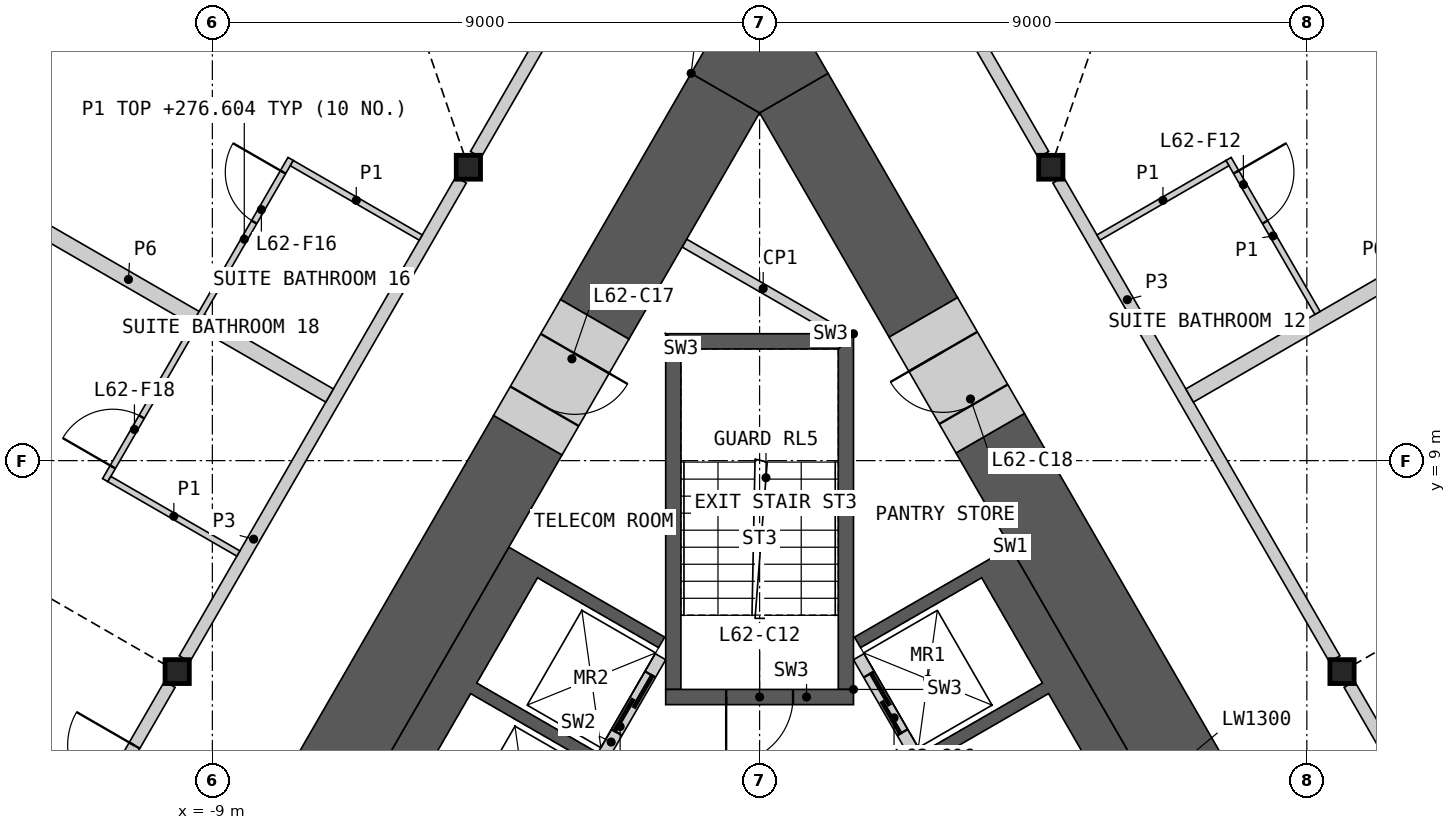
"""IFC4 building model, lengths in metres.
Left out: names, types, materials, properties, quantities, classifications, styles, units other than length and angle.
Written with IfcOpenShell. Run it as: python <this file> out.ifc"""

import sys

from ifc_helpers import new_model, si_unit, direction, frame, frame_2d, origin, origin_2d, place, context, subcontext, project, spatial, polyline, rectangle, i_section, outline, extrude, element, fill, save


model = new_model("IFC4")
c1 = context("Model", 3, precision=1e-05, world=origin(), true_north=direction((0.0, 1.0)))
c2 = subcontext(c1, "Body", "Model", "MODEL_VIEW")
j1 = project(units=[si_unit("LENGTHUNIT", "METRE"), si_unit("PLANEANGLEUNIT", "RADIAN")], contexts=[c1])
p1 = place(None, origin())
s1 = spatial("IfcSite", under=j1, at=p1, CompositionType="ELEMENT")
p2 = place(p1, origin())
s2 = spatial("IfcBuilding", under=s1, at=p2, CompositionType="ELEMENT")
p3 = place(p2, frame((0.0, 0.0, 274.2)))
s3 = spatial("IfcBuildingStorey", under=s2, at=p3, CompositionType="ELEMENT", Elevation=274.2)
for number, where, z_axis, x_axis in (
    (1, (-4.789, 13.825, 0.0), (0.0, 0.0, 1.0), (1.0, 0.0, 0.0)),
    (2, (-9.578, 5.53, 0.0), (0.0, 0.0, 1.0), (1.0, 0.0, 0.0)),
    (3, (9.578, 5.53, 0.0), (0.0, 0.0, 1.0), (1.0, 0.0, 0.0)),
    (4, (4.789, 13.825, 0.0), (0.0, 0.0, 1.0), (1.0, 0.0, 0.0)),
):
    element("IfcColumn", number, at=place(p3, frame(where, z_axis=z_axis, x_axis=x_axis)), inside=s3, PredefinedType="COLUMN", context=c2, shape_type="SweptSolid", body=[
        extrude(i_section(OverallWidth=0.399, OverallDepth=0.393, WebThickness=0.023, FlangeThickness=0.037, at=origin_2d()), origin(), (0.0, 0.0, 1.0), 3.6),
    ])
p4 = place(p3, origin())
e5 = element("IfcWall", 5, at=p4, inside=s3, PredefinedType="SHEAR", context=c2, shape_type="SweptSolid", body=[
    extrude(outline(polyline([(4.124, 7.577), (8.624, -0.217), (8.231, -0.444), (6.061, -1.697), (5.96, -1.524), (7.952, -0.374), (4.752, 5.169), (2.76, 4.019), (2.66, 4.192), (4.652, 5.342), (3.652, 7.074), (1.66, 5.924), (1.561, 6.097), (3.731, 7.35), (4.124, 7.577)])), origin(), (0.0, 0.0, 1.0), 3.25),
])
p5 = place(p3, frame((5.817, -1.476, 0.0), z_axis=(0.0, 0.0, 1.0), x_axis=(-0.500002616675, 0.866023893041, 0.0)))
e6 = element("IfcWall", 6, at=p5, inside=s3, PredefinedType="SOLIDWALL", context=c2, shape_type="SweptSolid", body=[
    extrude(rectangle(XDim=8.373, YDim=0.2, at=frame_2d((4.187, 0.0))), origin(), (0.0, 0.0, 1.0), 3.25),
])
p6 = place(p5, frame((2.637, 0.0, 0.0)))
e7 = element("IfcOpeningElement", 7, at=p6, cuts=e6, PredefinedType="OPENING", context=c2, shape_type="SweptSolid", body=[
    extrude(rectangle(XDim=0.9, YDim=2.1, at=frame_2d((0.45, 1.05))), frame((0.0, 0.11, 0.0), z_axis=(0.0, -1.0, 0.0), x_axis=(1.0, 0.0, 0.0)), (0.0, 0.0, 1.0), 0.22),
])
p7 = place(p5, frame((6.937, 0.0, 0.0)))
e8 = element("IfcOpeningElement", 8, at=p7, cuts=e6, PredefinedType="OPENING", context=c2, shape_type="SweptSolid", body=[
    extrude(rectangle(XDim=1.1, YDim=2.1, at=frame_2d((0.55, 1.05))), frame((0.0, 0.11, 0.0), z_axis=(0.0, -1.0, 0.0), x_axis=(1.0, 0.0, 0.0)), (0.0, 0.0, 1.0), 0.22),
])
p8 = place(p3, origin())
e9 = element("IfcWall", 9, at=p8, inside=s3, PredefinedType="SHEAR", context=c2, shape_type="SweptSolid", body=[
    extrude(outline(polyline([(-7.524, 1.688), (-4.124, 7.577), (-3.731, 7.35), (-1.561, 6.097), (-1.66, 5.924), (-3.652, 7.074), (-4.652, 5.342), (-2.66, 4.192), (-2.76, 4.019), (-4.752, 5.169), (-5.752, 3.437), (-3.76, 2.287), (-3.861, 2.113), (-5.852, 3.263), (-6.852, 1.531), (-4.861, 0.381), (-4.96, 0.208), (-7.131, 1.461), (-7.524, 1.688)])), origin(), (0.0, 0.0, 1.0), 3.25),
])
p9 = place(p3, frame((-1.631, 5.776, 0.0), z_axis=(0.0, 0.0, 1.0), x_axis=(-0.499992876559, -0.866029516466, 0.0)))
e10 = element("IfcWall", 10, at=p9, inside=s3, PredefinedType="SOLIDWALL", context=c2, shape_type="SweptSolid", body=[
    extrude(rectangle(XDim=6.486, YDim=0.2, at=frame_2d((3.243, 0.0))), origin(), (0.0, 0.0, 1.0), 3.25),
])
p10 = place(p9, frame((0.337, 0.0, 0.0)))
e11 = element("IfcOpeningElement", 11, at=p10, cuts=e10, PredefinedType="OPENING", context=c2, shape_type="SweptSolid", body=[
    extrude(rectangle(XDim=1.1, YDim=2.1, at=frame_2d((0.55, 1.05))), frame((0.0, 0.11, 0.0), z_axis=(0.0, -1.0, 0.0), x_axis=(1.0, 0.0, 0.0)), (0.0, 0.0, 1.0), 0.22),
])
p11 = place(p9, frame((2.537, 0.0, 0.0)))
e12 = element("IfcOpeningElement", 12, at=p11, cuts=e10, PredefinedType="OPENING", context=c2, shape_type="SweptSolid", body=[
    extrude(rectangle(XDim=1.1, YDim=2.1, at=frame_2d((0.55, 1.05))), frame((0.0, 0.11, 0.0), z_axis=(0.0, -1.0, 0.0), x_axis=(1.0, 0.0, 0.0)), (0.0, 0.0, 1.0), 0.22),
])
p12 = place(p3, origin())
e13 = element("IfcWall", 13, at=p12, inside=s3, PredefinedType="SHEAR", context=c2, shape_type="SweptSolid", body=[
    extrude(outline(polyline([(1.544, 5.237), (1.544, 11.087), (1.294, 10.837), (1.294, 5.237), (1.544, 5.237)])), origin(), (0.0, 0.0, 1.0), 3.25),
])
p13 = place(p3, origin())
e14 = element("IfcWall", 14, at=p13, inside=s3, PredefinedType="SHEAR", context=c2, shape_type="SweptSolid", body=[
    extrude(outline(polyline([(1.544, 11.087), (-1.544, 11.087), (-1.294, 10.837), (1.294, 10.837), (1.544, 11.087)])), origin(), (0.0, 0.0, 1.0), 3.25),
])
p14 = place(p3, origin())
e15 = element("IfcWall", 15, at=p14, inside=s3, PredefinedType="SHEAR", context=c2, shape_type="SweptSolid", body=[
    extrude(outline(polyline([(-1.294, 10.837), (-1.544, 11.087), (-1.544, 5.237), (-1.294, 5.237), (-1.294, 10.837)])), origin(), (0.0, 0.0, 1.0), 3.25),
])
p15 = place(p3, frame((1.544, 5.112, 0.0), z_axis=(0.0, 0.0, 1.0), x_axis=(-1.0, 0.0, 0.0)))
e16 = element("IfcWall", 16, at=p15, inside=s3, PredefinedType="SHEAR", context=c2, shape_type="SweptSolid", body=[
    extrude(rectangle(XDim=3.088, YDim=0.25, at=frame_2d((1.544, 0.0))), origin(), (0.0, 0.0, 1.0), 3.25),
])
p16 = place(p15, frame((0.994, 0.0, 0.0)))
e17 = element("IfcOpeningElement", 17, at=p16, cuts=e16, PredefinedType="OPENING", context=c2, shape_type="SweptSolid", body=[
    extrude(rectangle(XDim=1.1, YDim=2.1, at=frame_2d((0.55, 1.05))), frame((0.0, 0.135, 0.0), z_axis=(0.0, -1.0, 0.0), x_axis=(1.0, 0.0, 0.0)), (0.0, 0.0, 1.0), 0.27),
])
p17 = place(p3, frame((-1.237, 12.578, 0.0), z_axis=(0.0, 0.0, 1.0), x_axis=(0.866045649925, -0.499964931016, 0.0)))
e18 = element("IfcWall", 18, at=p17, inside=s3, PredefinedType="PARTITIONING", context=c2, shape_type="SweptSolid", body=[
    extrude(rectangle(XDim=2.992, YDim=0.15, at=frame_2d((1.496, 0.0))), origin(), (0.0, 0.0, 1.0), 3.25),
])
p18 = place(p3, frame((10.062, -1.408, 0.0), z_axis=(0.0, 0.0, 1.0), x_axis=(-0.500000545805, 0.866025088663, 0.0)))
e19 = element("IfcWall", 19, at=p18, inside=s3, PredefinedType="SHEAR", context=c2, shape_type="SweptSolid", body=[
    extrude(rectangle(XDim=12.539, YDim=1.3, at=frame_2d((6.27, 0.0))), origin(), (0.0, 0.0, 1.0), 3.25),
])
p19 = place(p3, frame((2.693, 11.356, 0.0), z_axis=(0.0, 0.0, 1.0), x_axis=(-0.50002837164, 0.866009022791, 0.0)))
e20 = element("IfcWall", 20, at=p19, inside=s3, PredefinedType="SHEAR", context=c2, shape_type="SweptSolid", body=[
    extrude(rectangle(XDim=4.26, YDim=1.3, at=frame_2d((2.13, 0.0))), origin(), (0.0, 0.0, 1.0), 3.25),
])
p20 = place(p3, frame((-3.812, 9.418, 0.0), z_axis=(0.0, 0.0, 1.0), x_axis=(-0.499995037753, -0.86602826872, 0.0)))
e21 = element("IfcWall", 21, at=p20, inside=s3, PredefinedType="SHEAR", context=c2, shape_type="SweptSolid", body=[
    extrude(rectangle(XDim=8.451, YDim=1.3, at=frame_2d((4.225, 0.0))), origin(), (0.0, 0.0, 1.0), 3.25),
])
p21 = place(p3, frame((-0.563, 15.045, 0.0), z_axis=(0.0, 0.0, 1.0), x_axis=(-0.499994567278, -0.866028540345, 0.0)))
e22 = element("IfcWall", 22, at=p21, inside=s3, PredefinedType="SHEAR", context=c2, shape_type="SweptSolid", body=[
    extrude(rectangle(XDim=4.297, YDim=1.3, at=frame_2d((2.149, 0.0))), origin(), (0.0, 0.0, 1.0), 3.25),
])
p22 = place(p3, origin())
e23 = element("IfcWall", 23, at=p22, inside=s3, PredefinedType="SHEAR", context=c2, shape_type="SweptSolid", body=[
    extrude(outline(polyline([(-1.126, 15.371), (0.0, 17.321), (1.126, 15.371), (0.0, 14.72), (-1.126, 15.371)])), origin(), (0.0, 0.0, 1.0), 3.25),
])
p23 = place(p3, frame((-2.712, 11.324, 0.0), z_axis=(0.0, 0.0, 1.0), x_axis=(-0.499946605688, -0.86605622881, 0.0)))
e24 = element("IfcWall", 24, at=p23, inside=s3, PredefinedType="SHEAR", context=c2, shape_type="SweptSolid", body=[
    extrude(rectangle(XDim=2.2, YDim=1.3, at=frame_2d((1.1, 0.0))), origin(), (0.0, 0.0, 1.0), 3.25),
])
p24 = place(p23, frame((0.65, 0.0, 0.0)))
e25 = element("IfcOpeningElement", 25, at=p24, cuts=e24, PredefinedType="OPENING", context=c2, shape_type="SweptSolid", body=[
    extrude(rectangle(XDim=1.0, YDim=2.1, at=frame_2d((0.5, 1.05))), frame((0.0, 0.66, 0.0), z_axis=(0.0, -1.0, 0.0), x_axis=(1.0, 0.0, 0.0)), (0.0, 0.0, 1.0), 1.32),
])
p25 = place(p3, frame((3.793, 9.451, 0.0), z_axis=(0.0, 0.0, 1.0), x_axis=(-0.499946605688, 0.86605622881, 0.0)))
e26 = element("IfcWall", 26, at=p25, inside=s3, PredefinedType="SHEAR", context=c2, shape_type="SweptSolid", body=[
    extrude(rectangle(XDim=2.2, YDim=1.3, at=frame_2d((1.1, 0.0))), origin(), (0.0, 0.0, 1.0), 3.25),
])
p26 = place(p25, frame((0.55, 0.0, 0.0)))
e27 = element("IfcOpeningElement", 27, at=p26, cuts=e26, PredefinedType="OPENING", context=c2, shape_type="SweptSolid", body=[
    extrude(rectangle(XDim=1.0, YDim=2.1, at=frame_2d((0.5, 1.05))), frame((0.0, 0.66, 0.0), z_axis=(0.0, -1.0, 0.0), x_axis=(1.0, 0.0, 0.0)), (0.0, 0.0, 1.0), 1.32),
])
p27 = place(p3, frame((-14.247, -2.556, 0.0), z_axis=(0.0, 0.0, 1.0), x_axis=(0.49998193945, 0.866035830797, 0.0)))
e28 = element("IfcWall", 28, at=p27, inside=s3, PredefinedType="PARTITIONING", context=c2, shape_type="SweptSolid", body=[
    extrude(rectangle(XDim=9.094, YDim=0.2, at=frame_2d((4.547, 0.0))), origin(), (0.0, 0.0, 1.0), 3.25),
])
p28 = place(p27, frame((6.833, 0.0, 0.0)))
e29 = element("IfcOpeningElement", 29, at=p28, cuts=e28, PredefinedType="OPENING", context=c2, shape_type="SweptSolid", body=[
    extrude(rectangle(XDim=1.1, YDim=2.1, at=frame_2d((0.55, 1.05))), frame((0.0, 0.11, 0.0), z_axis=(0.0, -1.0, 0.0), x_axis=(1.0, 0.0, 0.0)), (0.0, 0.0, 1.0), 0.22),
])
p29 = place(p3, frame((9.699, 5.321, 0.0), z_axis=(0.0, 0.0, 1.0), x_axis=(0.49998193945, -0.866035830797, 0.0)))
e30 = element("IfcWall", 30, at=p29, inside=s3, PredefinedType="PARTITIONING", context=c2, shape_type="SweptSolid", body=[
    extrude(rectangle(XDim=9.094, YDim=0.2, at=frame_2d((4.547, 0.0))), origin(), (0.0, 0.0, 1.0), 3.25),
])
p30 = place(p29, frame((1.162, 0.0, 0.0)))
e31 = element("IfcOpeningElement", 31, at=p30, cuts=e30, PredefinedType="OPENING", context=c2, shape_type="SweptSolid", body=[
    extrude(rectangle(XDim=1.1, YDim=2.1, at=frame_2d((0.55, 1.05))), frame((0.0, 0.11, 0.0), z_axis=(0.0, -1.0, 0.0), x_axis=(1.0, 0.0, 0.0)), (0.0, 0.0, 1.0), 0.22),
])
for number, where, z_axis, x_axis in (
    (32, (4.91, 13.616, 0.0), (0.0, 0.0, 1.0), (0.5, -0.866, 0.0)),
    (33, (-9.458, 5.74, 0.0), (0.0, 0.0, 1.0), (0.5, 0.866, 0.0)),
):
    element("IfcWall", number, at=place(p3, frame(where, z_axis=z_axis, x_axis=x_axis)), inside=s3, PredefinedType="PARTITIONING", context=c2, shape_type="SweptSolid", body=[
        extrude(rectangle(XDim=9.095, YDim=0.2, at=frame_2d((4.547, 0.0))), origin(), (0.0, 0.0, 1.0), 3.25),
    ])
for number, where, z_axis, x_axis in (
    (34, (7.073, 10.071, 0.0), (0.0, 0.0, 1.0), (0.866, 0.5, 0.0)),
    (35, (-13.687, 13.889, 0.0), (0.0, 0.0, 1.0), (0.866, -0.5, 0.0)),
):
    element("IfcWall", number, at=place(p3, frame(where, z_axis=z_axis, x_axis=x_axis)), inside=s3, PredefinedType="PARTITIONING", context=c2, shape_type="SweptSolid", body=[
        extrude(rectangle(XDim=7.638, YDim=0.25, at=frame_2d((3.819, 0.0))), origin(), (0.0, 0.0, 1.0), 2.404),
    ])
p31 = place(p3, frame((-4.668, 14.035, 0.0), z_axis=(0.0, 0.0, 1.0), x_axis=(0.499984524817, 0.866034338201, 0.0)))
e36 = element("IfcWall", 36, at=p31, inside=s3, PredefinedType="PARTITIONING", context=c2, shape_type="SweptSolid", body=[
    extrude(rectangle(XDim=5.51, YDim=0.2, at=frame_2d((2.755, 0.0))), origin(), (0.0, 0.0, 1.0), 3.25),
])
p32 = place(p31, frame((4.06, 0.0, 0.0)))
e37 = element("IfcOpeningElement", 37, at=p32, cuts=e36, PredefinedType="OPENING", context=c2, shape_type="SweptSolid", body=[
    extrude(rectangle(XDim=1.1, YDim=2.1, at=frame_2d((0.55, 1.05))), frame((0.0, 0.11, 0.0), z_axis=(0.0, -1.0, 0.0), x_axis=(1.0, 0.0, 0.0)), (0.0, 0.0, 1.0), 0.22),
])
p33 = place(p3, frame((1.913, 18.807, 0.0), z_axis=(0.0, 0.0, 1.0), x_axis=(0.499984524817, -0.866034338201, 0.0)))
e38 = element("IfcWall", 38, at=p33, inside=s3, PredefinedType="PARTITIONING", context=c2, shape_type="SweptSolid", body=[
    extrude(rectangle(XDim=5.51, YDim=0.2, at=frame_2d((2.755, 0.0))), origin(), (0.0, 0.0, 1.0), 3.25),
])
p34 = place(p33, frame((0.35, 0.0, 0.0)))
e39 = element("IfcOpeningElement", 39, at=p34, cuts=e38, PredefinedType="OPENING", context=c2, shape_type="SweptSolid", body=[
    extrude(rectangle(XDim=1.1, YDim=2.1, at=frame_2d((0.55, 1.05))), frame((0.0, 0.11, 0.0), z_axis=(0.0, -1.0, 0.0), x_axis=(1.0, 0.0, 0.0)), (0.0, 0.0, 1.0), 0.22),
])
p35 = place(p3, frame((-10.762, 8.679, 0.0), z_axis=(0.0, 0.0, 1.0), x_axis=(0.500008851346, 0.866020293397, 0.0)))
e40 = element("IfcWall", 40, at=p35, inside=s3, PredefinedType="PARTITIONING", context=c2, shape_type="SweptSolid", body=[
    extrude(rectangle(XDim=6.1, YDim=0.1, at=frame_2d((3.05, 0.0))), origin(), (0.0, 0.0, 1.0), 2.404),
])
p36 = place(p35, frame((4.9, 0.0, 0.0)))
e41 = element("IfcOpeningElement", 41, at=p36, cuts=e40, PredefinedType="OPENING", context=c2, shape_type="SweptSolid", body=[
    extrude(rectangle(XDim=0.95, YDim=2.1, at=frame_2d((0.475, 1.05))), frame((0.0, 0.06, 0.0), z_axis=(0.0, -1.0, 0.0), x_axis=(1.0, 0.0, 0.0)), (0.0, 0.0, 1.0), 0.12),
])
p37 = place(p35, frame((0.25, 0.0, 0.0)))
e42 = element("IfcOpeningElement", 42, at=p37, cuts=e40, PredefinedType="OPENING", context=c2, shape_type="SweptSolid", body=[
    extrude(rectangle(XDim=0.95, YDim=2.1, at=frame_2d((0.475, 1.05))), frame((0.0, 0.06, 0.0), z_axis=(0.0, -1.0, 0.0), x_axis=(1.0, 0.0, 0.0)), (0.0, 0.0, 1.0), 0.12),
])
p38 = place(p3, frame((7.712, 13.962, 0.0), z_axis=(0.0, 0.0, 1.0), x_axis=(0.500062034277, -0.865989585315, 0.0)))
e43 = element("IfcWall", 43, at=p38, inside=s3, PredefinedType="PARTITIONING", context=c2, shape_type="SweptSolid", body=[
    extrude(rectangle(XDim=2.925, YDim=0.1, at=frame_2d((1.462, 0.0))), origin(), (0.0, 0.0, 1.0), 2.404),
])
p39 = place(p38, frame((0.25, 0.0, 0.0)))
e44 = element("IfcOpeningElement", 44, at=p39, cuts=e43, PredefinedType="OPENING", context=c2, shape_type="SweptSolid", body=[
    extrude(rectangle(XDim=0.95, YDim=2.1, at=frame_2d((0.475, 1.05))), frame((0.0, 0.06, 0.0), z_axis=(0.0, -1.0, 0.0), x_axis=(1.0, 0.0, 0.0)), (0.0, 0.0, 1.0), 0.12),
])
p40 = place(p3, frame((-10.694, 8.698, 0.0), z_axis=(0.0, 0.0, 1.0), x_axis=(0.866032905446, -0.499987006516, 0.0)))
e45 = element("IfcWall", 45, at=p40, inside=s3, PredefinedType="PARTITIONING", context=c2, shape_type="SweptSolid", body=[
    extrude(rectangle(XDim=2.45, YDim=0.1, at=frame_2d((1.225, 0.0))), origin(), (0.0, 0.0, 1.0), 2.404),
])
for number, where, z_axis, x_axis in (
    (46, (5.573, 12.669, 0.0), (0.0, 0.0, 1.0), (0.866, 0.5, 0.0)),
    (47, (-7.694, 13.894, 0.0), (0.0, 0.0, 1.0), (0.866, -0.5, 0.0)),
):
    element("IfcWall", number, at=place(p3, frame(where, z_axis=z_axis, x_axis=x_axis)), inside=s3, PredefinedType="PARTITIONING", context=c2, shape_type="SweptSolid", body=[
        extrude(rectangle(XDim=2.45, YDim=0.1, at=frame_2d((1.225, 0.0))), origin(), (0.0, 0.0, 1.0), 2.404),
    ])
p41 = place(p7, origin())
e48 = element("IfcDoor", 48, at=p41, inside=s3, OperationType="SLIDING_TO_LEFT", PredefinedType="DOOR", context=c2, shape_type="SweptSolid", body=[
    extrude(rectangle(XDim=1.1, YDim=2.1, at=frame_2d((0.55, 1.05))), frame((0.0, 0.025, 0.0), z_axis=(0.0, -1.0, 0.0), x_axis=(1.0, 0.0, 0.0)), (0.0, 0.0, 1.0), 0.05),
])
fill(e8, e48)
p42 = place(p10, origin())
e49 = element("IfcDoor", 49, at=p42, inside=s3, OperationType="SLIDING_TO_LEFT", PredefinedType="DOOR", context=c2, shape_type="SweptSolid", body=[
    extrude(rectangle(XDim=1.1, YDim=2.1, at=frame_2d((0.55, 1.05))), frame((0.0, 0.025, 0.0), z_axis=(0.0, -1.0, 0.0), x_axis=(1.0, 0.0, 0.0)), (0.0, 0.0, 1.0), 0.05),
])
fill(e11, e49)
p43 = place(p16, origin())
e50 = element("IfcDoor", 50, at=p43, inside=s3, OperationType="SINGLE_SWING_RIGHT", PredefinedType="DOOR", context=c2, shape_type="SweptSolid", body=[
    extrude(rectangle(XDim=1.1, YDim=2.1, at=frame_2d((0.55, 1.05))), frame((0.0, 0.025, 0.0), z_axis=(0.0, -1.0, 0.0), x_axis=(1.0, 0.0, 0.0)), (0.0, 0.0, 1.0), 0.05),
])
fill(e17, e50)
p44 = place(p24, origin())
e51 = element("IfcDoor", 51, at=p44, inside=s3, OperationType="SINGLE_SWING_LEFT", PredefinedType="DOOR", context=c2, shape_type="SweptSolid", body=[
    extrude(rectangle(XDim=1.0, YDim=2.1, at=frame_2d((0.5, 1.05))), frame((0.0, 0.405, 0.0), z_axis=(0.0, -1.0, 0.0), x_axis=(1.0, 0.0, 0.0)), (0.0, 0.0, 1.0), 0.05),
])
fill(e25, e51)
p45 = place(p26, origin())
e52 = element("IfcDoor", 52, at=p45, inside=s3, OperationType="SINGLE_SWING_RIGHT", PredefinedType="DOOR", context=c2, shape_type="SweptSolid", body=[
    extrude(rectangle(XDim=1.0, YDim=2.1, at=frame_2d((0.5, 1.05))), frame((0.0, 0.405, 0.0), z_axis=(0.0, -1.0, 0.0), x_axis=(1.0, 0.0, 0.0)), (0.0, 0.0, 1.0), 0.05),
])
fill(e27, e52)
p46 = place(p39, origin())
e53 = element("IfcDoor", 53, at=p46, inside=s3, OperationType="SINGLE_SWING_LEFT", PredefinedType="DOOR", context=c2, shape_type="SweptSolid", body=[
    extrude(rectangle(XDim=0.95, YDim=2.1, at=frame_2d((0.475, 1.05))), frame((0.0, 0.025, 0.0), z_axis=(0.0, -1.0, 0.0), x_axis=(1.0, 0.0, 0.0)), (0.0, 0.0, 1.0), 0.05),
])
fill(e44, e53)
p47 = place(p36, origin())
e54 = element("IfcDoor", 54, at=p47, inside=s3, OperationType="SINGLE_SWING_RIGHT", PredefinedType="DOOR", context=c2, shape_type="SweptSolid", body=[
    extrude(rectangle(XDim=0.95, YDim=2.1, at=frame_2d((0.475, 1.05))), frame((0.0, 0.025, 0.0), z_axis=(0.0, -1.0, 0.0), x_axis=(1.0, 0.0, 0.0)), (0.0, 0.0, 1.0), 0.05),
])
fill(e41, e54)
p48 = place(p28, origin())
e55 = element("IfcDoor", 55, at=p48, inside=s3, OperationType="SINGLE_SWING_RIGHT", PredefinedType="DOOR", context=c2, shape_type="SweptSolid", body=[
    extrude(rectangle(XDim=1.1, YDim=2.1, at=frame_2d((0.55, 1.05))), frame((0.0, 0.025, 0.0), z_axis=(0.0, -1.0, 0.0), x_axis=(1.0, 0.0, 0.0)), (0.0, 0.0, 1.0), 0.05),
])
fill(e29, e55)
p49 = place(p37, origin())
e56 = element("IfcDoor", 56, at=p49, inside=s3, OperationType="SINGLE_SWING_LEFT", PredefinedType="DOOR", context=c2, shape_type="SweptSolid", body=[
    extrude(rectangle(XDim=0.95, YDim=2.1, at=frame_2d((0.475, 1.05))), frame((0.0, 0.025, 0.0), z_axis=(0.0, -1.0, 0.0), x_axis=(1.0, 0.0, 0.0)), (0.0, 0.0, 1.0), 0.05),
])
fill(e42, e56)
save(model, sys.argv[1])
